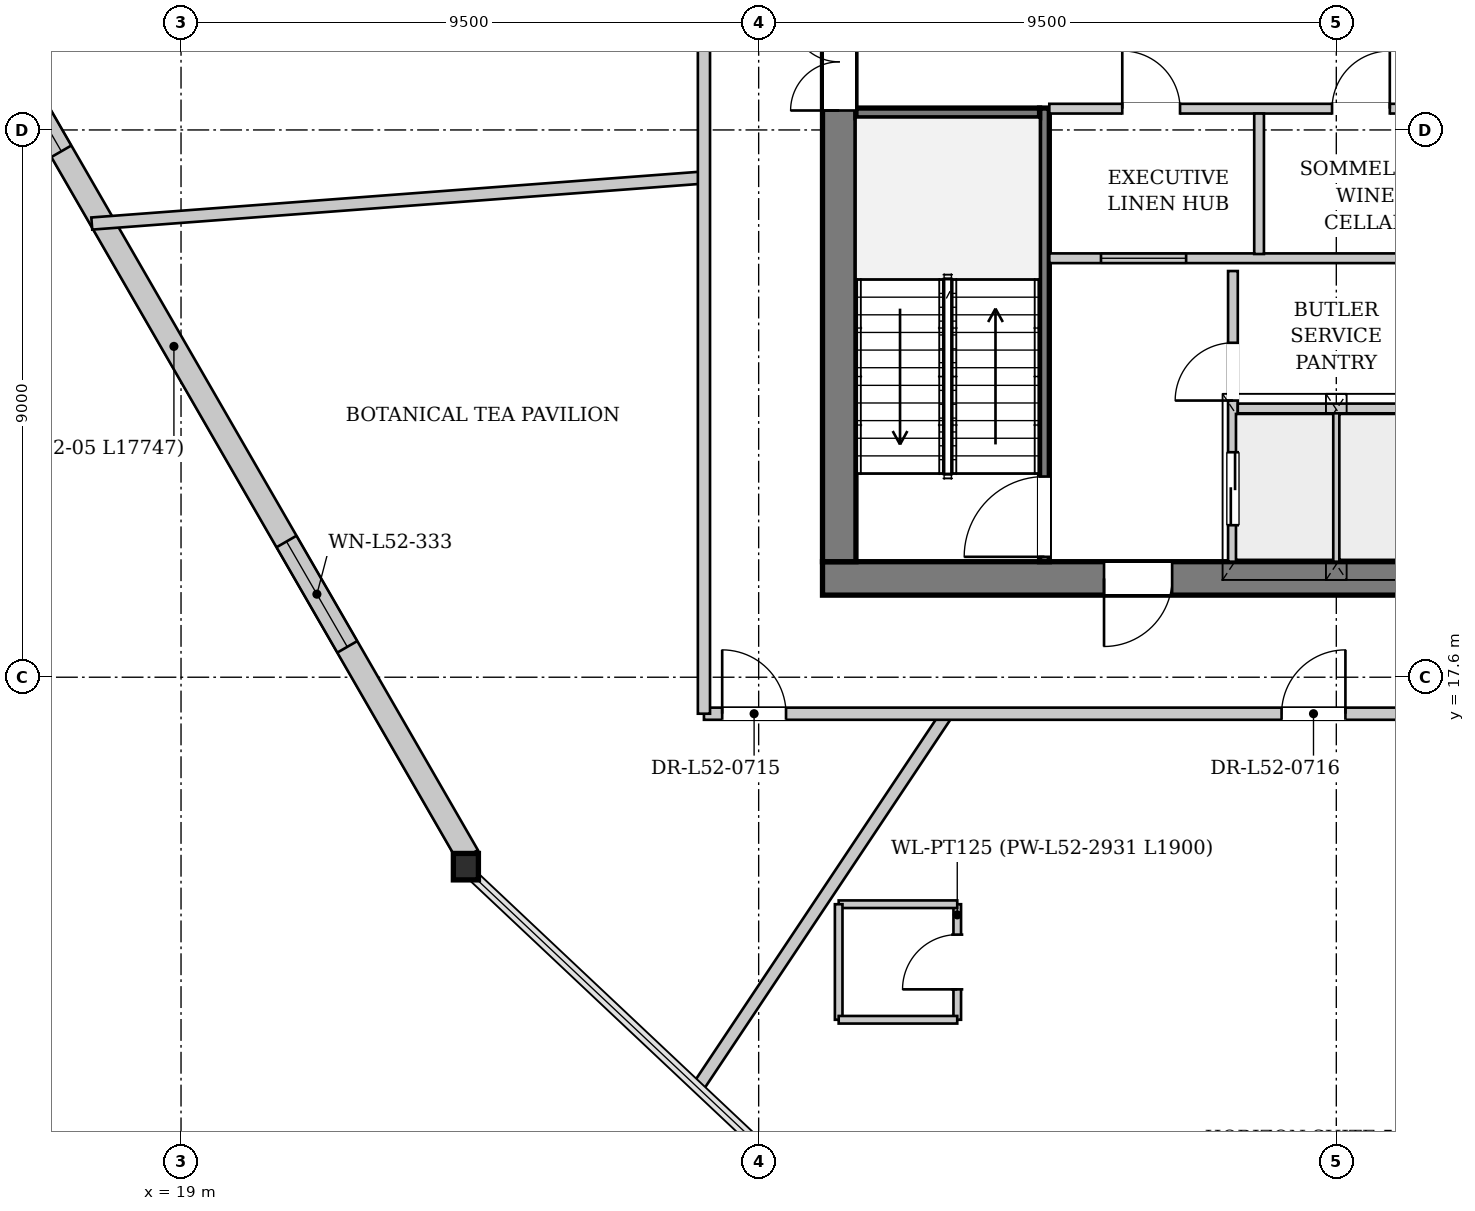
"""IFC4 building model, lengths in metres.
Left out: names, types, materials, properties, quantities, classifications, styles, units other than length and angle.
Written with IfcOpenShell. Run it as: python <this file> out.ifc"""

import sys

from ifc_helpers import new_model, si_unit, direction, frame, frame_2d, origin, origin_2d, place, context, subcontext, project, spatial, rectangle, i_section, extrude, source, transform, mapped, element, fill, save


model = new_model("IFC4")
c1 = context("Model", 3, precision=1e-05, world=origin(), true_north=direction((0.0, 1.0)))
c2 = subcontext(c1, "Body", "Model", "MODEL_VIEW")
j1 = project(units=[si_unit("LENGTHUNIT", "METRE"), si_unit("PLANEANGLEUNIT", "RADIAN")], contexts=[c1])
p1 = place(None, origin())
s1 = spatial("IfcSite", under=j1, at=p1, CompositionType="ELEMENT")
p2 = place(p1, origin())
s2 = spatial("IfcBuilding", under=s1, at=p2, CompositionType="ELEMENT")
p3 = place(p2, frame((0.0, 0.0, 196.3)))
s3 = spatial("IfcBuildingStorey", under=s2, at=p3, CompositionType="ELEMENT", Elevation=196.3)
m1 = source(origin(), c2, "Body", "SweptSolid", [
    extrude(i_section(OverallWidth=0.412, OverallDepth=0.435, WebThickness=0.031, FlangeThickness=0.05, at=origin_2d()), origin(), (0.0, 0.0, 1.0), 3.847),
])
p4 = place(p3, frame((23.553, 14.567, 0.0), z_axis=(0.068340422567, -0.042831741163, 0.996742207691), x_axis=(0.531059317965, 0.847334645109, 0.0)))
e1 = element("IfcColumn", 1, at=p4, inside=s3, PredefinedType="COLUMN", context=c2, shape_type="MappedRepresentation", body=[
    mapped(m1, transform((0.0, 0.0, 0.0), x_axis=(1.0, 0.0, 0.0), y_axis=(0.0, 1.0, 0.0), z_axis=(0.0, 0.0, 1.0), scale=1.0)),
])
p5 = place(p3, frame((23.718, 14.662, 0.0), z_axis=(0.0, 0.0, 1.0), x_axis=(-0.499820505407, 0.866129010237, 0.0)))
e2 = element("IfcWall", 2, at=p5, inside=s3, PredefinedType="SOLIDWALL", context=c2, shape_type="SweptSolid", body=[
    extrude(rectangle(XDim=17.747, YDim=0.38, at=frame_2d((8.873, 0.0))), origin(), (0.0, 0.0, 1.0), 3.172),
])
p6 = place(p5, frame((3.969, 0.0, 0.252)))
e3 = element("IfcOpeningElement", 3, at=p6, cuts=e2, PredefinedType="OPENING", context=c2, shape_type="SweptSolid", body=[
    extrude(rectangle(XDim=2.0, YDim=2.8, at=frame_2d((1.0, 1.4))), frame((0.0, 0.2, 0.0), z_axis=(0.0, -1.0, 0.0), x_axis=(1.0, 0.0, 0.0)), (0.0, 0.0, 1.0), 0.4),
])
p7 = place(p5, frame((13.378, 0.0, 0.252)))
e4 = element("IfcOpeningElement", 4, at=p7, cuts=e2, PredefinedType="OPENING", context=c2, shape_type="SweptSolid", body=[
    extrude(rectangle(XDim=2.0, YDim=2.8, at=frame_2d((1.0, 1.4))), frame((0.0, 0.2, 0.0), z_axis=(0.0, -1.0, 0.0), x_axis=(1.0, 0.0, 0.0)), (0.0, 0.0, 1.0), 0.4),
])
p8 = place(p3, frame((46.45, 19.225, 0.0), z_axis=(0.0, 0.0, 1.0), x_axis=(-1.0, 0.0, 0.0)))
e5 = element("IfcWall", 5, at=p8, inside=s3, PredefinedType="SHEAR", context=c2, shape_type="SweptSolid", body=[
    extrude(rectangle(XDim=16.9, YDim=0.55, at=frame_2d((8.45, 0.0))), origin(), (0.0, 0.0, 1.0), 3.78),
])
p9 = place(p8, frame((4.65, 0.0, 0.0)))
e6 = element("IfcOpeningElement", 6, at=p9, cuts=e5, PredefinedType="OPENING", context=c2, shape_type="SweptSolid", body=[
    extrude(rectangle(XDim=1.12, YDim=2.25, at=frame_2d((0.56, 1.125))), frame((0.0, 0.285, 0.0), z_axis=(0.0, -1.0, 0.0), x_axis=(1.0, 0.0, 0.0)), (0.0, 0.0, 1.0), 0.57),
])
p10 = place(p8, frame((11.15, 0.0, 0.0)))
e7 = element("IfcOpeningElement", 7, at=p10, cuts=e5, PredefinedType="OPENING", context=c2, shape_type="SweptSolid", body=[
    extrude(rectangle(XDim=1.12, YDim=2.25, at=frame_2d((0.56, 1.125))), frame((0.0, 0.285, 0.0), z_axis=(0.0, -1.0, 0.0), x_axis=(1.0, 0.0, 0.0)), (0.0, 0.0, 1.0), 0.57),
])
p11 = place(p3, frame((29.825, 19.5, 0.0), z_axis=(0.0, 0.0, 1.0), x_axis=(0.0, 1.0, 0.0)))
e8 = element("IfcWall", 8, at=p11, inside=s3, PredefinedType="SHEAR", context=c2, shape_type="SweptSolid", body=[
    extrude(rectangle(XDim=14.2, YDim=0.55, at=frame_2d((7.1, 0.0))), origin(), (0.0, 0.0, 1.0), 3.78),
])
p12 = place(p11, frame((7.42, 0.0, 0.0)))
e9 = element("IfcOpeningElement", 9, at=p12, cuts=e8, PredefinedType="OPENING", context=c2, shape_type="SweptSolid", body=[
    extrude(rectangle(XDim=1.6, YDim=2.2, at=frame_2d((0.8, 1.1))), frame((0.0, 0.285, 0.0), z_axis=(0.0, -1.0, 0.0), x_axis=(1.0, 0.0, 0.0)), (0.0, 0.0, 1.0), 0.57),
])
p13 = place(p3, frame((33.2, 19.5, 0.0), z_axis=(0.0, 0.0, 1.0), x_axis=(0.0, 1.0, 0.0)))
e10 = element("IfcWall", 10, at=p13, inside=s3, PredefinedType="PARTITIONING", context=c2, shape_type="SweptSolid", body=[
    extrude(rectangle(XDim=7.46, YDim=0.16, at=frame_2d((3.73, 0.0))), origin(), (0.0, 0.0, 1.0), 3.78),
])
p14 = place(p13, frame((0.08, 0.0, 0.0)))
e11 = element("IfcOpeningElement", 11, at=p14, cuts=e10, PredefinedType="OPENING", context=c2, shape_type="SweptSolid", body=[
    extrude(rectangle(XDim=1.32, YDim=2.2, at=frame_2d((0.66, 1.1))), frame((0.0, 0.09, 0.0), z_axis=(0.0, -1.0, 0.0), x_axis=(1.0, 0.0, 0.0)), (0.0, 0.0, 1.0), 0.18),
])
p15 = place(p3, frame((30.1, 26.88, 0.0), z_axis=(0.0, 0.0, 1.0), x_axis=(1.0, 0.0, 0.0)))
e12 = element("IfcWall", 12, at=p15, inside=s3, PredefinedType="PARTITIONING", context=c2, shape_type="SweptSolid", body=[
    extrude(rectangle(XDim=3.02, YDim=0.16, at=frame_2d((1.51, 0.0))), origin(), (0.0, 0.0, 1.0), 3.78),
])
p16 = place(p3, frame((36.3, 19.5, 0.0), z_axis=(0.0, 0.0, 1.0), x_axis=(0.0, 1.0, 0.0)))
e13 = element("IfcWall", 13, at=p16, inside=s3, PredefinedType="PARTITIONING", context=c2, shape_type="SweptSolid", body=[
    extrude(rectangle(XDim=4.78, YDim=0.16, at=frame_2d((2.39, 0.0))), origin(), (0.0, 0.0, 1.0), 3.78),
])
p17 = place(p16, frame((0.6, 0.0, 0.0)))
e14 = element("IfcOpeningElement", 14, at=p17, cuts=e13, PredefinedType="OPENING", context=c2, shape_type="SweptSolid", body=[
    extrude(rectangle(XDim=1.2, YDim=2.2, at=frame_2d((0.6, 1.1))), frame((0.0, 0.09, 0.0), z_axis=(0.0, -1.0, 0.0), x_axis=(1.0, 0.0, 0.0)), (0.0, 0.0, 1.0), 0.18),
])
p18 = place(p16, frame((2.65, 0.0, 0.0)))
e15 = element("IfcOpeningElement", 15, at=p18, cuts=e13, PredefinedType="OPENING", context=c2, shape_type="SweptSolid", body=[
    extrude(rectangle(XDim=0.95, YDim=2.1, at=frame_2d((0.475, 1.05))), frame((0.0, 0.09, 0.0), z_axis=(0.0, -1.0, 0.0), x_axis=(1.0, 0.0, 0.0)), (0.0, 0.0, 1.0), 0.18),
])
p19 = place(p3, frame((38.0, 19.5, 0.0), z_axis=(0.0, 0.0, 1.0), x_axis=(0.0, 1.0, 0.0)))
e16 = element("IfcWall", 16, at=p19, inside=s3, PredefinedType="PARTITIONING", context=c2, shape_type="SweptSolid", body=[
    extrude(rectangle(XDim=2.46, YDim=0.125, at=frame_2d((1.23, 0.0))), origin(), (0.0, 0.0, 1.0), 3.78),
])
p20 = place(p3, frame((36.38, 22.02, 0.0), z_axis=(0.0, 0.0, 1.0), x_axis=(1.0, 0.0, 0.0)))
e17 = element("IfcWall", 17, at=p20, inside=s3, PredefinedType="PARTITIONING", context=c2, shape_type="SweptSolid", body=[
    extrude(rectangle(XDim=3.24, YDim=0.16, at=frame_2d((1.62, 0.0))), origin(), (0.0, 0.0, 1.0), 3.78),
])
p21 = place(p3, frame((33.28, 24.49, 0.0), z_axis=(0.0, 0.0, 1.0), x_axis=(1.0, 0.0, 0.0)))
e18 = element("IfcWall", 18, at=p21, inside=s3, PredefinedType="PARTITIONING", context=c2, shape_type="SweptSolid", body=[
    extrude(rectangle(XDim=9.44, YDim=0.16, at=frame_2d((4.72, 0.0))), origin(), (0.0, 0.0, 1.0), 3.78),
])
p22 = place(p21, frame((0.85, 0.0, 0.95)))
e19 = element("IfcOpeningElement", 19, at=p22, cuts=e18, PredefinedType="OPENING", context=c2, shape_type="SweptSolid", body=[
    extrude(rectangle(XDim=1.4, YDim=1.8, at=frame_2d((0.7, 0.9))), frame((0.0, 0.09, 0.0), z_axis=(0.0, -1.0, 0.0), x_axis=(1.0, 0.0, 0.0)), (0.0, 0.0, 1.0), 0.18),
])
p23 = place(p3, frame((33.28, 26.95, 0.0), z_axis=(0.0, 0.0, 1.0), x_axis=(1.0, 0.0, 0.0)))
e20 = element("IfcWall", 20, at=p23, inside=s3, PredefinedType="PARTITIONING", context=c2, shape_type="SweptSolid", body=[
    extrude(rectangle(XDim=9.44, YDim=0.16, at=frame_2d((4.72, 0.0))), origin(), (0.0, 0.0, 1.0), 3.78),
])
p24 = place(p23, frame((1.2, 0.0, 0.0)))
e21 = element("IfcOpeningElement", 21, at=p24, cuts=e20, PredefinedType="OPENING", context=c2, shape_type="SweptSolid", body=[
    extrude(rectangle(XDim=0.95, YDim=2.1, at=frame_2d((0.475, 1.05))), frame((0.0, 0.09, 0.0), z_axis=(0.0, -1.0, 0.0), x_axis=(1.0, 0.0, 0.0)), (0.0, 0.0, 1.0), 0.18),
])
p25 = place(p23, frame((4.65, 0.0, 0.0)))
e22 = element("IfcOpeningElement", 22, at=p25, cuts=e20, PredefinedType="OPENING", context=c2, shape_type="SweptSolid", body=[
    extrude(rectangle(XDim=0.95, YDim=2.1, at=frame_2d((0.475, 1.05))), frame((0.0, 0.09, 0.0), z_axis=(0.0, -1.0, 0.0), x_axis=(1.0, 0.0, 0.0)), (0.0, 0.0, 1.0), 0.18),
])
p26 = place(p23, frame((7.67, 0.0, 0.0)))
e23 = element("IfcOpeningElement", 23, at=p26, cuts=e20, PredefinedType="OPENING", context=c2, shape_type="SweptSolid", body=[
    extrude(rectangle(XDim=1.1, YDim=2.2, at=frame_2d((0.55, 1.1))), frame((0.0, 0.09, 0.0), z_axis=(0.0, -1.0, 0.0), x_axis=(1.0, 0.0, 0.0)), (0.0, 0.0, 1.0), 0.18),
])
p27 = place(p3, frame((36.73, 24.56, 0.0), z_axis=(0.0, 0.0, 1.0), x_axis=(0.0, 1.0, 0.0)))
e24 = element("IfcWall", 24, at=p27, inside=s3, PredefinedType="PARTITIONING", context=c2, shape_type="SweptSolid", body=[
    extrude(rectangle(XDim=2.31, YDim=0.16, at=frame_2d((1.155, 0.0))), origin(), (0.0, 0.0, 1.0), 3.78),
])
p28 = place(p3, frame((27.6, 25.818, 0.0), z_axis=(0.0, 0.0, 1.0), x_axis=(-0.997184592546, -0.074985921274, 0.0)))
e25 = element("IfcWall", 25, at=p28, inside=s3, PredefinedType="PARTITIONING", context=c2, shape_type="SweptSolid", body=[
    extrude(rectangle(XDim=10.096, YDim=0.2, at=frame_2d((5.048, 0.0))), origin(), (0.0, 0.0, 1.0), 3.78),
])
p29 = place(p3, frame((31.598, 17.0, 0.0), z_axis=(0.0, 0.0, 1.0), x_axis=(-0.554845645731, -0.831953309635, 0.0)))
e26 = element("IfcWall", 26, at=p29, inside=s3, PredefinedType="PARTITIONING", context=c2, shape_type="SweptSolid", body=[
    extrude(rectangle(XDim=7.359, YDim=0.2, at=frame_2d((3.68, 0.0))), origin(), (0.0, 0.0, 1.0), 3.78),
])
p30 = place(p3, frame((31.766, 11.967, 0.0), z_axis=(0.0, 0.0, 1.0), x_axis=(0.0, 1.0, 0.0)))
e27 = element("IfcWall", 27, at=p30, inside=s3, PredefinedType="PARTITIONING", context=c2, shape_type="SweptSolid", body=[
    extrude(rectangle(XDim=1.9, YDim=0.125, at=frame_2d((0.95, 0.0))), origin(), (0.0, 0.0, 1.0), 3.78),
])
p31 = place(p30, frame((0.5, 0.0, 0.0)))
e28 = element("IfcOpeningElement", 28, at=p31, cuts=e27, PredefinedType="OPENING", context=c2, shape_type="SweptSolid", body=[
    extrude(rectangle(XDim=0.9, YDim=2.1, at=frame_2d((0.45, 1.05))), frame((0.0, 0.073, 0.0), z_axis=(0.0, -1.0, 0.0), x_axis=(1.0, 0.0, 0.0)), (0.0, 0.0, 1.0), 0.145),
])
p32 = place(p3, frame((31.766, 13.867, 0.0), z_axis=(0.0, 0.0, 1.0), x_axis=(-1.0, 0.0, 0.0)))
e29 = element("IfcWall", 29, at=p32, inside=s3, PredefinedType="PARTITIONING", context=c2, shape_type="SweptSolid", body=[
    extrude(rectangle(XDim=1.95, YDim=0.125, at=frame_2d((0.975, 0.0))), origin(), (0.0, 0.0, 1.0), 3.78),
])
p33 = place(p3, frame((29.816, 13.867, 0.0), z_axis=(0.0, 0.0, 1.0), x_axis=(0.0, -1.0, 0.0)))
e30 = element("IfcWall", 30, at=p33, inside=s3, PredefinedType="PARTITIONING", context=c2, shape_type="SweptSolid", body=[
    extrude(rectangle(XDim=1.9, YDim=0.125, at=frame_2d((0.95, 0.0))), origin(), (0.0, 0.0, 1.0), 3.78),
])
p34 = place(p3, frame((29.816, 11.967, 0.0), z_axis=(0.0, 0.0, 1.0), x_axis=(1.0, 0.0, 0.0)))
e31 = element("IfcWall", 31, at=p34, inside=s3, PredefinedType="PARTITIONING", context=c2, shape_type="SweptSolid", body=[
    extrude(rectangle(XDim=1.95, YDim=0.125, at=frame_2d((0.975, 0.0))), origin(), (0.0, 0.0, 1.0), 3.78),
])
p35 = place(p3, frame((27.6, 17.0, 0.0), z_axis=(0.0, 0.0, 1.0), x_axis=(1.0, 0.0, 0.0)))
e32 = element("IfcWall", 32, at=p35, inside=s3, PredefinedType="PARTITIONING", context=c2, shape_type="SweptSolid", body=[
    extrude(rectangle(XDim=20.8, YDim=0.2, at=frame_2d((10.4, 0.0))), origin(), (0.0, 0.0, 1.0), 3.78),
])
p36 = place(p35, frame((0.3, 0.0, 0.0)))
e33 = element("IfcOpeningElement", 33, at=p36, cuts=e32, PredefinedType="OPENING", context=c2, shape_type="SweptSolid", body=[
    extrude(rectangle(XDim=1.05, YDim=2.2, at=frame_2d((0.525, 1.1))), frame((0.0, 0.11, 0.0), z_axis=(0.0, -1.0, 0.0), x_axis=(1.0, 0.0, 0.0)), (0.0, 0.0, 1.0), 0.22),
])
p37 = place(p35, frame((9.5, 0.0, 0.0)))
e34 = element("IfcOpeningElement", 34, at=p37, cuts=e32, PredefinedType="OPENING", context=c2, shape_type="SweptSolid", body=[
    extrude(rectangle(XDim=1.05, YDim=2.2, at=frame_2d((0.525, 1.1))), frame((0.0, 0.11, 0.0), z_axis=(0.0, -1.0, 0.0), x_axis=(1.0, 0.0, 0.0)), (0.0, 0.0, 1.0), 0.22),
])
p38 = place(p35, frame((16.773, 0.0, 0.0)))
e35 = element("IfcOpeningElement", 35, at=p38, cuts=e32, PredefinedType="OPENING", context=c2, shape_type="SweptSolid", body=[
    extrude(rectangle(XDim=1.05, YDim=2.2, at=frame_2d((0.525, 1.1))), frame((0.0, 0.11, 0.0), z_axis=(0.0, -1.0, 0.0), x_axis=(1.0, 0.0, 0.0)), (0.0, 0.0, 1.0), 0.22),
])
p39 = place(p3, frame((27.6, 17.0, 0.0), z_axis=(0.0, 0.0, 1.0), x_axis=(0.0, 1.0, 0.0)))
e36 = element("IfcWall", 36, at=p39, inside=s3, PredefinedType="PARTITIONING", context=c2, shape_type="SweptSolid", body=[
    extrude(rectangle(XDim=19.2, YDim=0.2, at=frame_2d((9.6, 0.0))), origin(), (0.0, 0.0, 1.0), 3.78),
])
p40 = place(p39, frame((14.326, 0.0, 0.0)))
e37 = element("IfcOpeningElement", 37, at=p40, cuts=e36, PredefinedType="OPENING", context=c2, shape_type="SweptSolid", body=[
    extrude(rectangle(XDim=1.05, YDim=2.2, at=frame_2d((0.525, 1.1))), frame((0.0, 0.11, 0.0), z_axis=(0.0, -1.0, 0.0), x_axis=(1.0, 0.0, 0.0)), (0.0, 0.0, 1.0), 0.22),
])
m2 = source(origin(), c2, "Body", "SweptSolid", [
    extrude(rectangle(XDim=2.0, YDim=2.8, at=frame_2d((1.0, 1.4))), frame((0.0, 0.03, 0.0), z_axis=(0.0, -1.0, 0.0), x_axis=(1.0, 0.0, 0.0)), (0.0, 0.0, 1.0), 0.06),
])
p41 = place(p6, origin())
e38 = element("IfcWindow", 38, at=p41, inside=s3, PartitioningType="SINGLE_PANEL", PredefinedType="WINDOW", context=c2, shape_type="MappedRepresentation", body=[
    mapped(m2, transform((0.0, 0.0, 0.0), x_axis=(1.0, 0.0, 0.0), y_axis=(0.0, 1.0, 0.0), z_axis=(0.0, 0.0, 1.0), scale=1.0)),
])
fill(e3, e38)
p42 = place(p7, origin())
e39 = element("IfcWindow", 39, at=p42, inside=s3, PartitioningType="SINGLE_PANEL", PredefinedType="WINDOW", context=c2, shape_type="MappedRepresentation", body=[
    mapped(m2, transform((0.0, 0.0, 0.0), x_axis=(1.0, 0.0, 0.0), y_axis=(0.0, 1.0, 0.0), z_axis=(0.0, 0.0, 1.0), scale=1.0)),
])
fill(e4, e39)
m3 = source(origin(), c2, "Body", "SweptSolid", [
    extrude(rectangle(XDim=1.12, YDim=2.25, at=frame_2d((0.56, 1.125))), frame((0.0, 0.025, 0.0), z_axis=(0.0, -1.0, 0.0), x_axis=(1.0, 0.0, 0.0)), (0.0, 0.0, 1.0), 0.05),
])
p43 = place(p10, origin())
e40 = element("IfcDoor", 40, at=p43, inside=s3, OperationType="SINGLE_SWING_RIGHT", PredefinedType="DOOR", context=c2, shape_type="MappedRepresentation", body=[
    mapped(m3, transform((0.0, 0.0, 0.0), x_axis=(1.0, 0.0, 0.0), y_axis=(0.0, 1.0, 0.0), z_axis=(0.0, 0.0, 1.0), scale=1.0)),
])
fill(e7, e40)
m4 = source(origin(), c2, "Body", "SweptSolid", [
    extrude(rectangle(XDim=1.6, YDim=2.2, at=frame_2d((0.8, 1.1))), frame((0.0, 0.025, 0.0), z_axis=(0.0, -1.0, 0.0), x_axis=(1.0, 0.0, 0.0)), (0.0, 0.0, 1.0), 0.05),
])
p44 = place(p12, origin())
e41 = element("IfcDoor", 41, at=p44, inside=s3, OperationType="DOUBLE_DOOR_SINGLE_SWING", PredefinedType="DOOR", context=c2, shape_type="MappedRepresentation", body=[
    mapped(m4, transform((0.0, 0.0, 0.0), x_axis=(1.0, 0.0, 0.0), y_axis=(0.0, 1.0, 0.0), z_axis=(0.0, 0.0, 1.0), scale=1.0)),
])
fill(e9, e41)
m5 = source(origin(), c2, "Body", "SweptSolid", [
    extrude(rectangle(XDim=1.32, YDim=2.2, at=frame_2d((0.66, 1.1))), frame((0.0, 0.025, 0.0), z_axis=(0.0, -1.0, 0.0), x_axis=(1.0, 0.0, 0.0)), (0.0, 0.0, 1.0), 0.05),
])
p45 = place(p14, origin())
e42 = element("IfcDoor", 42, at=p45, inside=s3, OperationType="SINGLE_SWING_LEFT", PredefinedType="DOOR", context=c2, shape_type="MappedRepresentation", body=[
    mapped(m5, transform((0.0, 0.0, 0.0), x_axis=(1.0, 0.0, 0.0), y_axis=(0.0, 1.0, 0.0), z_axis=(0.0, 0.0, 1.0), scale=1.0)),
])
fill(e11, e42)
m6 = source(origin(), c2, "Body", "SweptSolid", [
    extrude(rectangle(XDim=1.2, YDim=2.2, at=frame_2d((0.6, 1.1))), frame((0.0, 0.025, 0.0), z_axis=(0.0, -1.0, 0.0), x_axis=(1.0, 0.0, 0.0)), (0.0, 0.0, 1.0), 0.05),
])
p46 = place(p17, origin())
e43 = element("IfcDoor", 43, at=p46, inside=s3, OperationType="DOUBLE_DOOR_SLIDING", PredefinedType="DOOR", context=c2, shape_type="MappedRepresentation", body=[
    mapped(m6, transform((0.0, 0.0, 0.0), x_axis=(1.0, 0.0, 0.0), y_axis=(0.0, 1.0, 0.0), z_axis=(0.0, 0.0, 1.0), scale=1.0)),
])
fill(e14, e43)
m7 = source(origin(), c2, "Body", "SweptSolid", [
    extrude(rectangle(XDim=0.95, YDim=2.1, at=frame_2d((0.475, 1.05))), frame((0.0, 0.025, 0.0), z_axis=(0.0, -1.0, 0.0), x_axis=(1.0, 0.0, 0.0)), (0.0, 0.0, 1.0), 0.05),
])
p47 = place(p18, origin())
e44 = element("IfcDoor", 44, at=p47, inside=s3, OperationType="SINGLE_SWING_LEFT", PredefinedType="DOOR", context=c2, shape_type="MappedRepresentation", body=[
    mapped(m7, transform((0.0, 0.0, 0.0), x_axis=(1.0, 0.0, 0.0), y_axis=(0.0, 1.0, 0.0), z_axis=(0.0, 0.0, 1.0), scale=1.0)),
])
fill(e15, e44)
p48 = place(p24, origin())
e45 = element("IfcDoor", 45, at=p48, inside=s3, OperationType="SINGLE_SWING_LEFT", PredefinedType="DOOR", context=c2, shape_type="MappedRepresentation", body=[
    mapped(m7, transform((0.0, 0.0, 0.0), x_axis=(1.0, 0.0, 0.0), y_axis=(0.0, 1.0, 0.0), z_axis=(0.0, 0.0, 1.0), scale=1.0)),
])
fill(e21, e45)
p49 = place(p25, origin())
e46 = element("IfcDoor", 46, at=p49, inside=s3, OperationType="SINGLE_SWING_RIGHT", PredefinedType="DOOR", context=c2, shape_type="MappedRepresentation", body=[
    mapped(m7, transform((0.0, 0.0, 0.0), x_axis=(1.0, 0.0, 0.0), y_axis=(0.0, 1.0, 0.0), z_axis=(0.0, 0.0, 1.0), scale=1.0)),
])
fill(e22, e46)
m8 = source(origin(), c2, "Body", "SweptSolid", [
    extrude(rectangle(XDim=0.9, YDim=2.1, at=frame_2d((0.45, 1.05))), frame((0.0, 0.025, 0.0), z_axis=(0.0, -1.0, 0.0), x_axis=(1.0, 0.0, 0.0)), (0.0, 0.0, 1.0), 0.05),
])
p50 = place(p31, origin())
e47 = element("IfcDoor", 47, at=p50, inside=s3, OperationType="SINGLE_SWING_LEFT", PredefinedType="DOOR", context=c2, shape_type="MappedRepresentation", body=[
    mapped(m8, transform((0.0, 0.0, 0.0), x_axis=(1.0, 0.0, 0.0), y_axis=(0.0, 1.0, 0.0), z_axis=(0.0, 0.0, 1.0), scale=1.0)),
])
fill(e28, e47)
m9 = source(origin(), c2, "Body", "SweptSolid", [
    extrude(rectangle(XDim=1.05, YDim=2.2, at=frame_2d((0.525, 1.1))), frame((0.0, 0.025, 0.0), z_axis=(0.0, -1.0, 0.0), x_axis=(1.0, 0.0, 0.0)), (0.0, 0.0, 1.0), 0.05),
])
p51 = place(p36, origin())
e48 = element("IfcDoor", 48, at=p51, inside=s3, OperationType="SINGLE_SWING_LEFT", PredefinedType="DOOR", context=c2, shape_type="MappedRepresentation", body=[
    mapped(m9, transform((0.0, 0.0, 0.0), x_axis=(1.0, 0.0, 0.0), y_axis=(0.0, 1.0, 0.0), z_axis=(0.0, 0.0, 1.0), scale=1.0)),
])
fill(e33, e48)
p52 = place(p37, origin())
e49 = element("IfcDoor", 49, at=p52, inside=s3, OperationType="SINGLE_SWING_RIGHT", PredefinedType="DOOR", context=c2, shape_type="MappedRepresentation", body=[
    mapped(m9, transform((0.0, 0.0, 0.0), x_axis=(1.0, 0.0, 0.0), y_axis=(0.0, 1.0, 0.0), z_axis=(0.0, 0.0, 1.0), scale=1.0)),
])
fill(e34, e49)
m10 = source(origin(), c2, "Body", "SweptSolid", [
    extrude(rectangle(XDim=1.4, YDim=1.8, at=frame_2d((0.7, 0.9))), frame((0.0, 0.03, 0.0), z_axis=(0.0, -1.0, 0.0), x_axis=(1.0, 0.0, 0.0)), (0.0, 0.0, 1.0), 0.06),
])
p53 = place(p22, origin())
e50 = element("IfcWindow", 50, at=p53, inside=s3, PartitioningType="SINGLE_PANEL", PredefinedType="WINDOW", context=c2, shape_type="MappedRepresentation", body=[
    mapped(m10, transform((0.0, 0.0, 0.0), x_axis=(1.0, 0.0, 0.0), y_axis=(0.0, 1.0, 0.0), z_axis=(0.0, 0.0, 1.0), scale=1.0)),
])
fill(e19, e50)
save(model, sys.argv[1])
